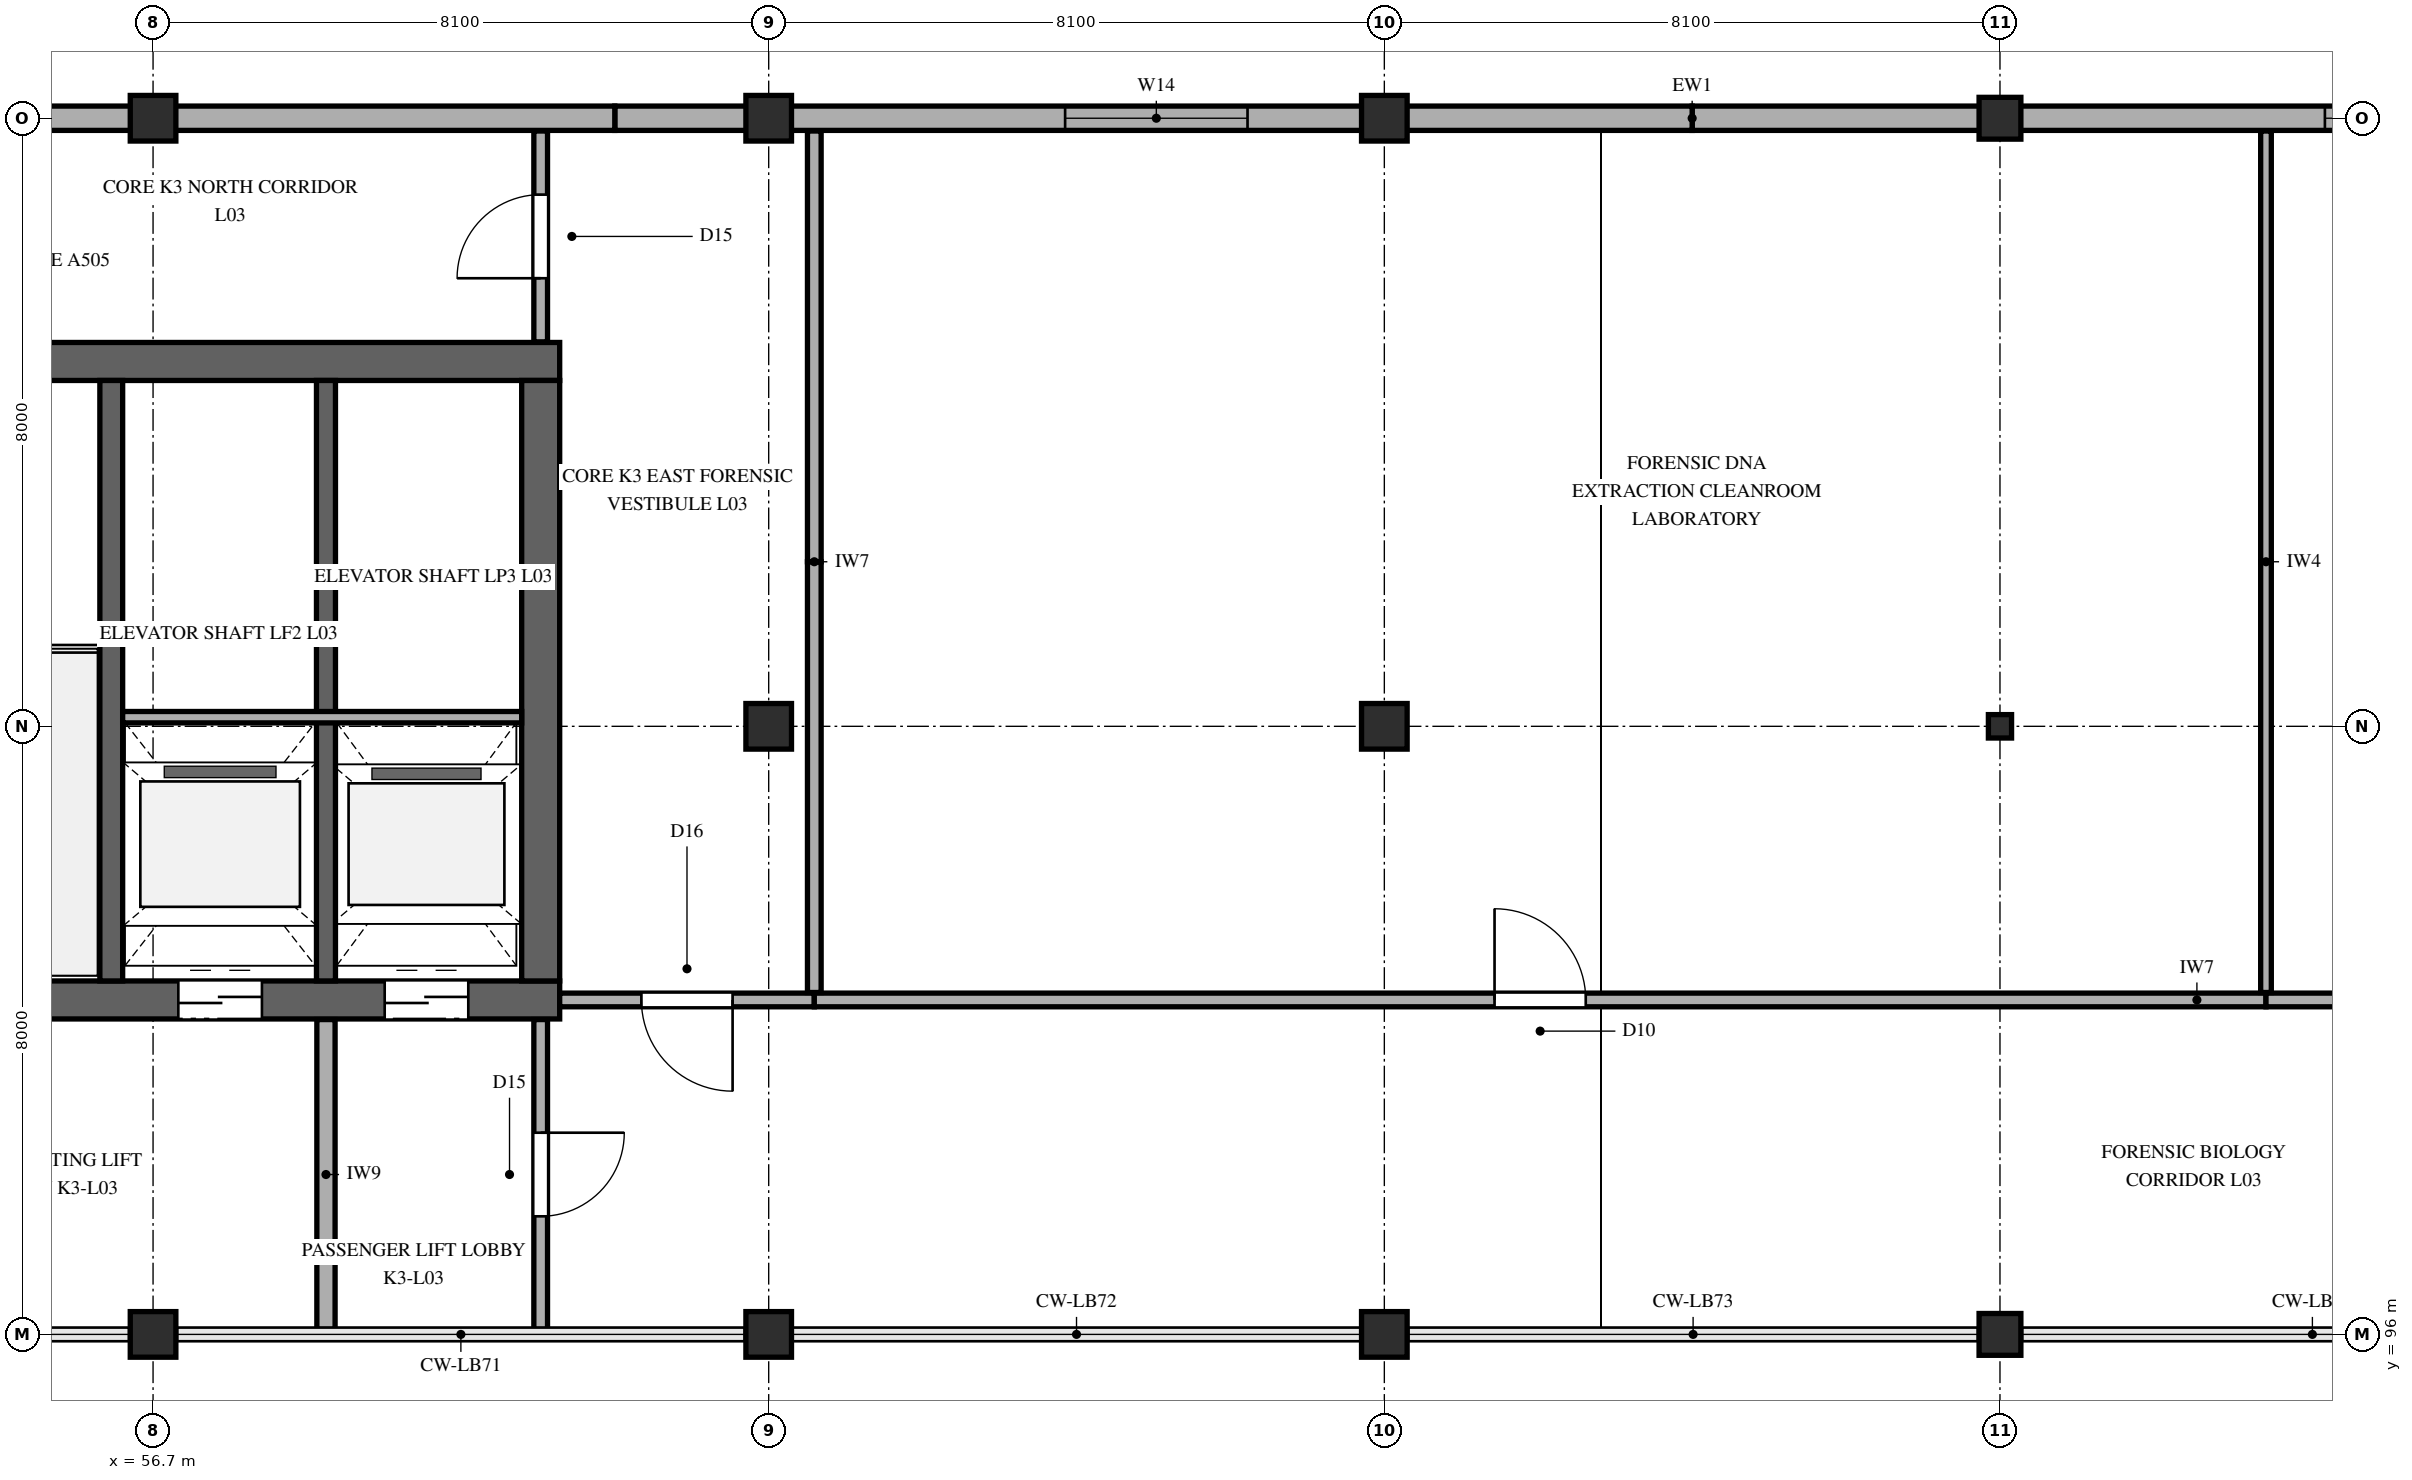
"""IFC4 building model, lengths in metres.
Left out: names, types, materials, properties, quantities, classifications, styles, units other than length and angle.
Written with IfcOpenShell. Run it as: python <this file> out.ifc"""

import sys

from ifc_helpers import new_model, si_unit, direction, frame, frame_2d, origin, origin_2d, place, context, subcontext, project, spatial, rectangle, i_section, extrude, element, fill, save


model = new_model("IFC4")
c1 = context("Model", 3, precision=1e-05, world=origin(), true_north=direction((0.0, 1.0)))
c2 = subcontext(c1, "Body", "Model", "MODEL_VIEW")
j1 = project(units=[si_unit("LENGTHUNIT", "METRE"), si_unit("PLANEANGLEUNIT", "RADIAN")], contexts=[c1])
p1 = place(None, origin())
s1 = spatial("IfcSite", under=j1, at=p1, CompositionType="ELEMENT")
p2 = place(p1, origin())
s2 = spatial("IfcBuilding", under=s1, at=p2, CompositionType="ELEMENT")
p3 = place(p2, frame((0.0, 0.0, 14.7)))
s3 = spatial("IfcBuildingStorey", under=s2, at=p3, CompositionType="ELEMENT", Elevation=14.7)
p4 = place(p3, frame((46.75, 100.4, 0.0), z_axis=(0.0, 0.0, 1.0), x_axis=(1.0, 0.0, 0.0)))
e1 = element("IfcWall", 1, at=p4, inside=s3, PredefinedType="SHEAR", context=c2, shape_type="SweptSolid", body=[
    extrude(rectangle(XDim=15.3, YDim=0.5, at=frame_2d((7.65, 0.0))), origin(), (0.0, 0.0, 1.0), 5.1),
])
p5 = place(p4, frame((1.0, 0.0, 0.0)))
e2 = element("IfcOpeningElement", 2, at=p5, cuts=e1, PredefinedType="OPENING", context=c2, shape_type="SweptSolid", body=[
    extrude(rectangle(XDim=1.15, YDim=2.25, at=frame_2d((0.575, 1.125))), frame((0.0, 0.26, 0.0), z_axis=(0.0, -1.0, 0.0), x_axis=(1.0, 0.0, 0.0)), (0.0, 0.0, 1.0), 0.52),
])
p6 = place(p4, frame((10.282, 0.0, 0.0)))
e3 = element("IfcOpeningElement", 3, at=p6, cuts=e1, PredefinedType="OPENING", context=c2, shape_type="SweptSolid", body=[
    extrude(rectangle(XDim=1.1, YDim=2.2, at=frame_2d((0.55, 1.1))), frame((0.0, 0.26, 0.0), z_axis=(0.0, -1.0, 0.0), x_axis=(1.0, 0.0, 0.0)), (0.0, 0.0, 1.0), 0.52),
])
p7 = place(p4, frame((12.998, 0.0, 0.0)))
e4 = element("IfcOpeningElement", 4, at=p7, cuts=e1, PredefinedType="OPENING", context=c2, shape_type="SweptSolid", body=[
    extrude(rectangle(XDim=1.1, YDim=2.2, at=frame_2d((0.55, 1.1))), frame((0.0, 0.26, 0.0), z_axis=(0.0, -1.0, 0.0), x_axis=(1.0, 0.0, 0.0)), (0.0, 0.0, 1.0), 0.52),
])
p8 = place(p3, frame((46.75, 108.8, 0.0), z_axis=(0.0, 0.0, 1.0), x_axis=(1.0, 0.0, 0.0)))
e5 = element("IfcWall", 5, at=p8, inside=s3, PredefinedType="SHEAR", context=c2, shape_type="SweptSolid", body=[
    extrude(rectangle(XDim=15.3, YDim=0.5, at=frame_2d((7.65, 0.0))), origin(), (0.0, 0.0, 1.0), 5.1),
])
p9 = place(p3, frame((61.8, 100.65, 0.0), z_axis=(0.0, 0.0, 1.0), x_axis=(0.0, 1.0, 0.0)))
e6 = element("IfcWall", 6, at=p9, inside=s3, PredefinedType="SHEAR", context=c2, shape_type="SweptSolid", body=[
    extrude(rectangle(XDim=7.9, YDim=0.5, at=frame_2d((3.95, 0.0))), origin(), (0.0, 0.0, 1.0), 5.1),
])
p10 = place(p3, frame((56.15, 100.65, 0.0), z_axis=(0.0, 0.0, 1.0), x_axis=(0.0, 1.0, 0.0)))
e7 = element("IfcWall", 7, at=p10, inside=s3, PredefinedType="SHEAR", context=c2, shape_type="SweptSolid", body=[
    extrude(rectangle(XDim=7.9, YDim=0.3, at=frame_2d((3.95, 0.0))), origin(), (0.0, 0.0, 1.0), 5.1),
])
p11 = place(p3, frame((58.975, 100.65, 0.0), z_axis=(0.0, 0.0, 1.0), x_axis=(0.0, 1.0, 0.0)))
e8 = element("IfcWall", 8, at=p11, inside=s3, PredefinedType="SHEAR", context=c2, shape_type="SweptSolid", body=[
    extrude(rectangle(XDim=7.9, YDim=0.25, at=frame_2d((3.95, 0.0))), origin(), (0.0, 0.0, 1.0), 5.1),
])
for number, where, z_axis, x_axis in (
    (9, (56.7, 96.0, 0.0), (0.0, 0.0, 1.0), (1.0, 0.0, 0.0)),
    (10, (56.7, 112.0, 0.0), (0.0, 0.0, 1.0), (1.0, 0.0, 0.0)),
    (11, (64.8, 96.0, 0.0), (0.0, 0.0, 1.0), (1.0, 0.0, 0.0)),
    (12, (64.8, 104.0, 0.0), (0.0, 0.0, 1.0), (1.0, 0.0, 0.0)),
    (13, (64.8, 112.0, 0.0), (0.0, 0.0, 1.0), (1.0, 0.0, 0.0)),
    (14, (72.9, 96.0, 0.0), (0.0, 0.0, 1.0), (1.0, 0.0, 0.0)),
    (15, (72.9, 104.0, 0.0), (0.0, 0.0, 1.0), (1.0, 0.0, 0.0)),
    (16, (72.9, 112.0, 0.0), (0.0, 0.0, 1.0), (1.0, 0.0, 0.0)),
):
    element("IfcColumn", number, at=place(p3, frame(where, z_axis=z_axis, x_axis=x_axis)), inside=s3, PredefinedType="COLUMN", context=c2, shape_type="SweptSolid", body=[
        extrude(rectangle(XDim=0.6, YDim=0.6, at=origin_2d()), origin(), (0.0, 0.0, 1.0), 5.1),
    ])
p12 = place(p3, frame((81.0, 96.0, 0.0), z_axis=(0.0, 0.0, 1.0), x_axis=(1.0, 0.0, 0.0)))
e17 = element("IfcColumn", 17, at=p12, inside=s3, PredefinedType="COLUMN", context=c2, shape_type="SweptSolid", body=[
    extrude(rectangle(XDim=0.55, YDim=0.55, at=origin_2d()), origin(), (0.0, 0.0, 1.0), 5.1),
])
p13 = place(p3, frame((81.0, 104.0, 0.0), z_axis=(0.0, 0.0, 1.0), x_axis=(1.0, 0.0, 0.0)))
e18 = element("IfcColumn", 18, at=p13, inside=s3, PredefinedType="COLUMN", context=c2, shape_type="SweptSolid", body=[
    extrude(i_section(OverallWidth=0.305, OverallDepth=0.308, WebThickness=0.01, FlangeThickness=0.015, FilletRadius=0.015, at=origin_2d()), origin(), (0.0, 0.0, 1.0), 5.1),
])
p14 = place(p3, frame((81.0, 112.0, 0.0), z_axis=(0.0, 0.0, 1.0), x_axis=(1.0, 0.0, 0.0)))
e19 = element("IfcColumn", 19, at=p14, inside=s3, PredefinedType="COLUMN", context=c2, shape_type="SweptSolid", body=[
    extrude(rectangle(XDim=0.55, YDim=0.55, at=origin_2d()), origin(), (0.0, 0.0, 1.0), 5.1),
])
p15 = place(p3, frame((91.125, 112.0, 0.0), z_axis=(0.0, 0.0, 1.0), x_axis=(-1.0, 0.0, 0.0)))
e20 = element("IfcWall", 20, at=p15, inside=s3, PredefinedType="SOLIDWALL", context=c2, shape_type="SweptSolid", body=[
    extrude(rectangle(XDim=14.175, YDim=0.32, at=frame_2d((7.087, 0.0))), origin(), (0.0, 0.0, 1.0), 4.232),
])
p16 = place(p15, frame((3.6, 0.0, 0.95)))
e21 = element("IfcOpeningElement", 21, at=p16, cuts=e20, PredefinedType="OPENING", context=c2, shape_type="SweptSolid", body=[
    extrude(rectangle(XDim=2.25, YDim=1.8, at=frame_2d((1.125, 0.9))), frame((0.0, 0.17, 0.0), z_axis=(0.0, -1.0, 0.0), x_axis=(1.0, 0.0, 0.0)), (0.0, 0.0, 1.0), 0.34),
])
p17 = place(p3, frame((76.95, 112.0, 0.0), z_axis=(0.0, 0.0, 1.0), x_axis=(-1.0, 0.0, 0.0)))
e22 = element("IfcWall", 22, at=p17, inside=s3, PredefinedType="SOLIDWALL", context=c2, shape_type="SweptSolid", body=[
    extrude(rectangle(XDim=14.175, YDim=0.32, at=frame_2d((7.087, 0.0))), origin(), (0.0, 0.0, 1.0), 4.232),
])
p18 = place(p17, frame((5.85, 0.0, 0.95)))
e23 = element("IfcOpeningElement", 23, at=p18, cuts=e22, PredefinedType="OPENING", context=c2, shape_type="SweptSolid", body=[
    extrude(rectangle(XDim=2.4, YDim=1.6, at=frame_2d((1.2, 0.8))), frame((0.0, 0.17, 0.0), z_axis=(0.0, -1.0, 0.0), x_axis=(1.0, 0.0, 0.0)), (0.0, 0.0, 1.0), 0.34),
])
p19 = place(p3, frame((62.775, 112.0, 0.0), z_axis=(0.0, 0.0, 1.0), x_axis=(-1.0, 0.0, 0.0)))
e24 = element("IfcWall", 24, at=p19, inside=s3, PredefinedType="SOLIDWALL", context=c2, shape_type="SweptSolid", body=[
    extrude(rectangle(XDim=14.175, YDim=0.32, at=frame_2d((7.087, 0.0))), origin(), (0.0, 0.0, 1.0), 4.232),
])
p20 = place(p19, frame((8.1, 0.0, 0.95)))
e25 = element("IfcOpeningElement", 25, at=p20, cuts=e24, PredefinedType="OPENING", context=c2, shape_type="SweptSolid", body=[
    extrude(rectangle(XDim=2.7, YDim=1.8, at=frame_2d((1.35, 0.9))), frame((0.0, 0.17, 0.0), z_axis=(0.0, -1.0, 0.0), x_axis=(1.0, 0.0, 0.0)), (0.0, 0.0, 1.0), 0.34),
])
p21 = place(p3, frame((56.3, 104.12, 0.0), z_axis=(0.0, 0.0, 1.0), x_axis=(1.0, 0.0, 0.0)))
e26 = element("IfcWall", 26, at=p21, inside=s3, PredefinedType="PARTITIONING", context=c2, shape_type="SweptSolid", body=[
    extrude(rectangle(XDim=5.25, YDim=0.15, at=frame_2d((2.625, 0.0))), origin(), (0.0, 0.0, 1.0), 4.84),
])
p22 = place(p3, frame((62.05, 100.4, 0.0), z_axis=(0.0, 0.0, 1.0), x_axis=(1.0, 0.0, 0.0)))
e27 = element("IfcWall", 27, at=p22, inside=s3, PredefinedType="PARTITIONING", context=c2, shape_type="SweptSolid", body=[
    extrude(rectangle(XDim=3.35, YDim=0.18, at=frame_2d((1.675, 0.0))), origin(), (0.0, 0.0, 1.0), 4.84),
])
p23 = place(p22, frame((1.075, 0.0, 0.0)))
e28 = element("IfcOpeningElement", 28, at=p23, cuts=e27, PredefinedType="OPENING", context=c2, shape_type="SweptSolid", body=[
    extrude(rectangle(XDim=1.2, YDim=2.2, at=frame_2d((0.6, 1.1))), frame((0.0, 0.1, 0.0), z_axis=(0.0, -1.0, 0.0), x_axis=(1.0, 0.0, 0.0)), (0.0, 0.0, 1.0), 0.2),
])
p24 = place(p3, frame((65.4, 100.4, 0.0), z_axis=(0.0, 0.0, 1.0), x_axis=(1.0, 0.0, 0.0)))
e29 = element("IfcWall", 29, at=p24, inside=s3, PredefinedType="PARTITIONING", context=c2, shape_type="SweptSolid", body=[
    extrude(rectangle(XDim=19.1, YDim=0.18, at=frame_2d((9.55, 0.0))), origin(), (0.0, 0.0, 1.0), 4.84),
])
p25 = place(p24, frame((8.95, 0.0, 0.0)))
e30 = element("IfcOpeningElement", 30, at=p25, cuts=e29, PredefinedType="OPENING", context=c2, shape_type="SweptSolid", body=[
    extrude(rectangle(XDim=1.2, YDim=2.3, at=frame_2d((0.6, 1.15))), frame((0.0, 0.1, 0.0), z_axis=(0.0, -1.0, 0.0), x_axis=(1.0, 0.0, 0.0)), (0.0, 0.0, 1.0), 0.2),
])
p26 = place(p3, frame((84.5, 100.4, 0.0), z_axis=(0.0, 0.0, 1.0), x_axis=(1.0, 0.0, 0.0)))
e31 = element("IfcWall", 31, at=p26, inside=s3, PredefinedType="PARTITIONING", context=c2, shape_type="SweptSolid", body=[
    extrude(rectangle(XDim=20.632, YDim=0.18, at=frame_2d((10.316, 0.0))), origin(), (0.0, 0.0, 1.0), 4.84),
])
p27 = place(p26, frame((9.716, 0.0, 0.0)))
e32 = element("IfcOpeningElement", 32, at=p27, cuts=e31, PredefinedType="OPENING", context=c2, shape_type="SweptSolid", body=[
    extrude(rectangle(XDim=1.2, YDim=2.3, at=frame_2d((0.6, 1.15))), frame((0.0, 0.1, 0.0), z_axis=(0.0, -1.0, 0.0), x_axis=(1.0, 0.0, 0.0)), (0.0, 0.0, 1.0), 0.2),
])
p28 = place(p3, frame((58.975, 96.065, 0.0), z_axis=(0.0, 0.0, 1.0), x_axis=(0.0, 1.0, 0.0)))
e33 = element("IfcWall", 33, at=p28, inside=s3, PredefinedType="PARTITIONING", context=c2, shape_type="SweptSolid", body=[
    extrude(rectangle(XDim=4.077, YDim=0.24, at=frame_2d((2.039, 0.0))), origin(), (0.0, 0.0, 1.0), 4.84),
])
p29 = place(p3, frame((61.8, 96.065, 0.0), z_axis=(0.0, 0.0, 1.0), x_axis=(0.0, 1.0, 0.0)))
e34 = element("IfcWall", 34, at=p29, inside=s3, PredefinedType="PARTITIONING", context=c2, shape_type="SweptSolid", body=[
    extrude(rectangle(XDim=4.077, YDim=0.18, at=frame_2d((2.039, 0.0))), origin(), (0.0, 0.0, 1.0), 4.84),
])
p30 = place(p29, frame((1.489, 0.0, 0.0)))
e35 = element("IfcOpeningElement", 35, at=p30, cuts=e34, PredefinedType="OPENING", context=c2, shape_type="SweptSolid", body=[
    extrude(rectangle(XDim=1.1, YDim=2.2, at=frame_2d((0.55, 1.1))), frame((0.0, 0.1, 0.0), z_axis=(0.0, -1.0, 0.0), x_axis=(1.0, 0.0, 0.0)), (0.0, 0.0, 1.0), 0.2),
])
p31 = place(p3, frame((61.8, 109.058, 0.0), z_axis=(0.0, 0.0, 1.0), x_axis=(0.0, 1.0, 0.0)))
e36 = element("IfcWall", 36, at=p31, inside=s3, PredefinedType="PARTITIONING", context=c2, shape_type="SweptSolid", body=[
    extrude(rectangle(XDim=2.774, YDim=0.18, at=frame_2d((1.387, 0.0))), origin(), (0.0, 0.0, 1.0), 4.84),
])
p32 = place(p31, frame((0.837, 0.0, 0.0)))
e37 = element("IfcOpeningElement", 37, at=p32, cuts=e36, PredefinedType="OPENING", context=c2, shape_type="SweptSolid", body=[
    extrude(rectangle(XDim=1.1, YDim=2.2, at=frame_2d((0.55, 1.1))), frame((0.0, 0.1, 0.0), z_axis=(0.0, -1.0, 0.0), x_axis=(1.0, 0.0, 0.0)), (0.0, 0.0, 1.0), 0.2),
])
for number, where, z_axis, x_axis in (
    (38, (65.4, 100.498, 0.0), (0.0, 0.0, 1.0), (0.0, 1.0, 0.0)),
    (39, (65.4, 106.165, 0.0), (0.0, 0.0, 1.0), (0.0, 1.0, 0.0)),
):
    element("IfcWall", number, at=place(p3, frame(where, z_axis=z_axis, x_axis=x_axis)), inside=s3, PredefinedType="PARTITIONING", context=c2, shape_type="SweptSolid", body=[
        extrude(rectangle(XDim=5.667, YDim=0.18, at=frame_2d((2.833, 0.0))), origin(), (0.0, 0.0, 1.0), 4.84),
    ])
for number, where, z_axis, x_axis in (
    (40, (84.5, 100.498, 0.0), (0.0, 0.0, 1.0), (0.0, 1.0, 0.0)),
    (41, (84.5, 106.165, 0.0), (0.0, 0.0, 1.0), (0.0, 1.0, 0.0)),
):
    element("IfcWall", number, at=place(p3, frame(where, z_axis=z_axis, x_axis=x_axis)), inside=s3, PredefinedType="PARTITIONING", context=c2, shape_type="SweptSolid", body=[
        extrude(rectangle(XDim=5.667, YDim=0.14, at=frame_2d((2.833, 0.0))), origin(), (0.0, 0.0, 1.0), 4.84),
    ])
p33 = place(p16, origin())
e42 = element("IfcWindow", 42, at=p33, inside=s3, PartitioningType="TRIPLE_PANEL_VERTICAL", PredefinedType="WINDOW", context=c2, shape_type="SweptSolid", body=[
    extrude(rectangle(XDim=2.25, YDim=1.8, at=frame_2d((1.125, 0.9))), frame((0.0, 0.03, 0.0), z_axis=(0.0, -1.0, 0.0), x_axis=(1.0, 0.0, 0.0)), (0.0, 0.0, 1.0), 0.06),
])
fill(e21, e42)
p34 = place(p18, origin())
e43 = element("IfcWindow", 43, at=p34, inside=s3, PartitioningType="TRIPLE_PANEL_VERTICAL", PredefinedType="WINDOW", context=c2, shape_type="SweptSolid", body=[
    extrude(rectangle(XDim=2.4, YDim=1.6, at=frame_2d((1.2, 0.8))), frame((0.0, 0.03, 0.0), z_axis=(0.0, -1.0, 0.0), x_axis=(1.0, 0.0, 0.0)), (0.0, 0.0, 1.0), 0.06),
])
fill(e23, e43)
p35 = place(p6, frame((1.1, 0.0, 0.0), z_axis=(0.0, 0.0, 1.0), x_axis=(-1.0, 0.0, 0.0)))
e44 = element("IfcDoor", 44, at=p35, inside=s3, OperationType="DOUBLE_DOOR_SLIDING", PredefinedType="DOOR", context=c2, shape_type="SweptSolid", body=[
    extrude(rectangle(XDim=1.1, YDim=2.2, at=frame_2d((0.55, 1.1))), frame((0.0, 0.025, 0.0), z_axis=(0.0, -1.0, 0.0), x_axis=(1.0, 0.0, 0.0)), (0.0, 0.0, 1.0), 0.05),
])
fill(e3, e44)
p36 = place(p7, frame((1.1, 0.0, 0.0), z_axis=(0.0, 0.0, 1.0), x_axis=(-1.0, 0.0, 0.0)))
e45 = element("IfcDoor", 45, at=p36, inside=s3, OperationType="DOUBLE_DOOR_SLIDING", PredefinedType="DOOR", context=c2, shape_type="SweptSolid", body=[
    extrude(rectangle(XDim=1.1, YDim=2.2, at=frame_2d((0.55, 1.1))), frame((0.0, 0.025, 0.0), z_axis=(0.0, -1.0, 0.0), x_axis=(1.0, 0.0, 0.0)), (0.0, 0.0, 1.0), 0.05),
])
fill(e4, e45)
p37 = place(p23, frame((1.2, 0.0, 0.0), z_axis=(0.0, 0.0, 1.0), x_axis=(-1.0, 0.0, 0.0)))
e46 = element("IfcDoor", 46, at=p37, inside=s3, OperationType="SINGLE_SWING_RIGHT", PredefinedType="DOOR", context=c2, shape_type="SweptSolid", body=[
    extrude(rectangle(XDim=1.2, YDim=2.2, at=frame_2d((0.6, 1.1))), frame((0.0, 0.025, 0.0), z_axis=(0.0, -1.0, 0.0), x_axis=(1.0, 0.0, 0.0)), (0.0, 0.0, 1.0), 0.05),
])
fill(e28, e46)
p38 = place(p25, origin())
e47 = element("IfcDoor", 47, at=p38, inside=s3, OperationType="SINGLE_SWING_LEFT", PredefinedType="DOOR", context=c2, shape_type="SweptSolid", body=[
    extrude(rectangle(XDim=1.2, YDim=2.3, at=frame_2d((0.6, 1.15))), frame((0.0, 0.025, 0.0), z_axis=(0.0, -1.0, 0.0), x_axis=(1.0, 0.0, 0.0)), (0.0, 0.0, 1.0), 0.05),
])
fill(e30, e47)
p39 = place(p30, frame((1.1, 0.0, 0.0), z_axis=(0.0, 0.0, 1.0), x_axis=(-1.0, 0.0, 0.0)))
e48 = element("IfcDoor", 48, at=p39, inside=s3, OperationType="SINGLE_SWING_RIGHT", PredefinedType="DOOR", context=c2, shape_type="SweptSolid", body=[
    extrude(rectangle(XDim=1.1, YDim=2.2, at=frame_2d((0.55, 1.1))), frame((0.0, 0.025, 0.0), z_axis=(0.0, -1.0, 0.0), x_axis=(1.0, 0.0, 0.0)), (0.0, 0.0, 1.0), 0.05),
])
fill(e35, e48)
p40 = place(p32, origin())
e49 = element("IfcDoor", 49, at=p40, inside=s3, OperationType="SINGLE_SWING_LEFT", PredefinedType="DOOR", context=c2, shape_type="SweptSolid", body=[
    extrude(rectangle(XDim=1.1, YDim=2.2, at=frame_2d((0.55, 1.1))), frame((0.0, 0.025, 0.0), z_axis=(0.0, -1.0, 0.0), x_axis=(1.0, 0.0, 0.0)), (0.0, 0.0, 1.0), 0.05),
])
fill(e37, e49)
save(model, sys.argv[1])
